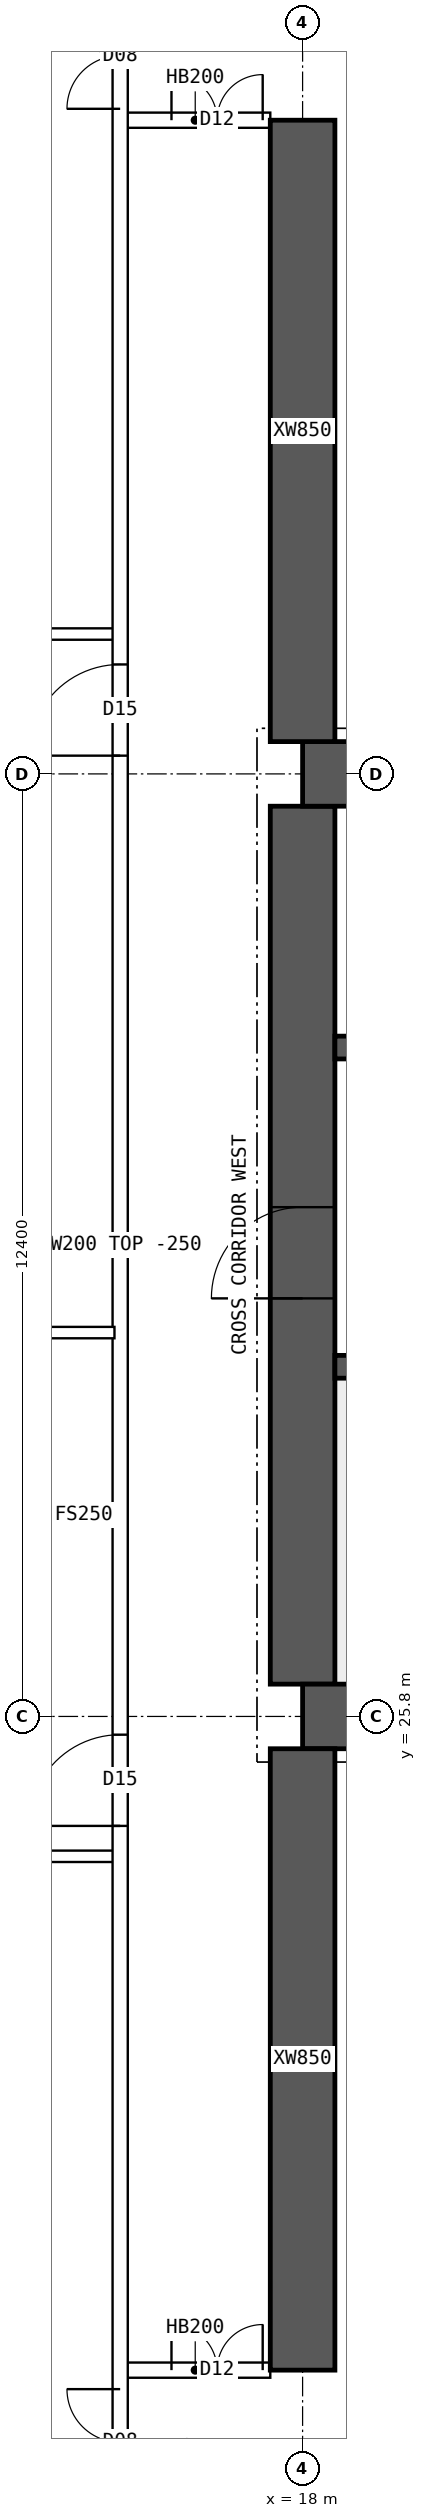
"""IFC4 building model, lengths in metres.
Left out: names, types, materials, properties, quantities, classifications, styles, units other than length and angle.
Written with IfcOpenShell. Run it as: python <this file> out.ifc"""

import sys

from ifc_helpers import new_model, si_unit, direction, frame, frame_2d, origin, place, context, subcontext, project, spatial, polyline, rectangle, outline, extrude, element, fill, save


model = new_model("IFC4")
c1 = context("Model", 3, precision=1e-05, world=origin(), true_north=direction((0.0, 1.0)))
c2 = subcontext(c1, "Body", "Model", "MODEL_VIEW")
j1 = project(units=[si_unit("LENGTHUNIT", "METRE"), si_unit("PLANEANGLEUNIT", "RADIAN")], contexts=[c1])
p1 = place(None, origin())
s1 = spatial("IfcSite", under=j1, at=p1, CompositionType="ELEMENT")
p2 = place(p1, origin())
s2 = spatial("IfcBuilding", under=s1, at=p2, CompositionType="ELEMENT")
p3 = place(p2, frame((0.0, 0.0, 156.1)))
s3 = spatial("IfcBuildingStorey", under=s2, at=p3, CompositionType="ELEMENT", Elevation=156.1)
for number, where, z_axis, x_axis in (
    (1, (18.0, 25.8, 0.0), (0.0, 0.0, 1.0), (1.0, 0.0, 0.0)),
    (2, (18.0, 38.2, 0.0), (0.0, 0.0, 1.0), (1.0, 0.0, 0.0)),
):
    element("IfcWall", number, at=place(p3, frame(where, z_axis=z_axis, x_axis=x_axis)), inside=s3, PredefinedType="SHEAR", context=c2, shape_type="SweptSolid", body=[
        extrude(rectangle(XDim=48.0, YDim=0.85, at=frame_2d((24.0, 0.0))), origin(), (0.0, 0.0, 1.0), 3.75),
    ])
p4 = place(p3, frame((18.0, 26.225, 0.0), z_axis=(0.0, 0.0, 1.0), x_axis=(0.0, 1.0, 0.0)))
e3 = element("IfcWall", 3, at=p4, inside=s3, PredefinedType="SHEAR", context=c2, shape_type="SweptSolid", body=[
    extrude(rectangle(XDim=11.55, YDim=0.85, at=frame_2d((5.775, 0.0))), origin(), (0.0, 0.0, 1.0), 3.75),
])
p5 = place(p4, frame((5.075, 0.0, 0.0)))
e4 = element("IfcOpeningElement", 4, at=p5, cuts=e3, PredefinedType="OPENING", context=c2, shape_type="SweptSolid", body=[
    extrude(rectangle(XDim=1.2, YDim=2.1, at=frame_2d((0.6, 1.05))), frame((0.0, 0.435, 0.0), z_axis=(0.0, -1.0, 0.0), x_axis=(1.0, 0.0, 0.0)), (0.0, 0.0, 1.0), 0.87),
])
p6 = place(p3, frame((18.425, 30.4, 0.0), z_axis=(0.0, 0.0, 1.0), x_axis=(1.0, 0.0, 0.0)))
e5 = element("IfcWall", 5, at=p6, inside=s3, PredefinedType="SHEAR", context=c2, shape_type="SweptSolid", body=[
    extrude(rectangle(XDim=47.15, YDim=0.3, at=frame_2d((23.575, 0.0))), origin(), (0.0, 0.0, 1.0), 3.75),
])
p7 = place(p6, frame((0.4, 0.0, 0.0)))
e6 = element("IfcOpeningElement", 6, at=p7, cuts=e5, PredefinedType="OPENING", context=c2, shape_type="SweptSolid", body=[
    extrude(rectangle(XDim=1.0, YDim=2.1, at=frame_2d((0.5, 1.05))), frame((0.0, 0.16, 0.0), z_axis=(0.0, -1.0, 0.0), x_axis=(1.0, 0.0, 0.0)), (0.0, 0.0, 1.0), 0.32),
])
p8 = place(p6, frame((45.75, 0.0, 0.0)))
e7 = element("IfcOpeningElement", 7, at=p8, cuts=e5, PredefinedType="OPENING", context=c2, shape_type="SweptSolid", body=[
    extrude(rectangle(XDim=1.0, YDim=2.1, at=frame_2d((0.5, 1.05))), frame((0.0, 0.16, 0.0), z_axis=(0.0, -1.0, 0.0), x_axis=(1.0, 0.0, 0.0)), (0.0, 0.0, 1.0), 0.32),
])
p9 = place(p6, frame((8.325, 0.0, 0.0)))
e8 = element("IfcOpeningElement", 8, at=p9, cuts=e5, PredefinedType="OPENING", context=c2, shape_type="SweptSolid", body=[
    extrude(rectangle(XDim=1.1, YDim=2.1, at=frame_2d((0.55, 1.05))), frame((0.0, 0.16, 0.0), z_axis=(0.0, -1.0, 0.0), x_axis=(1.0, 0.0, 0.0)), (0.0, 0.0, 1.0), 0.32),
])
p10 = place(p6, frame((10.925, 0.0, 0.0)))
e9 = element("IfcOpeningElement", 9, at=p10, cuts=e5, PredefinedType="OPENING", context=c2, shape_type="SweptSolid", body=[
    extrude(rectangle(XDim=1.1, YDim=2.1, at=frame_2d((0.55, 1.05))), frame((0.0, 0.16, 0.0), z_axis=(0.0, -1.0, 0.0), x_axis=(1.0, 0.0, 0.0)), (0.0, 0.0, 1.0), 0.32),
])
p11 = place(p6, frame((13.525, 0.0, 0.0)))
e10 = element("IfcOpeningElement", 10, at=p11, cuts=e5, PredefinedType="OPENING", context=c2, shape_type="SweptSolid", body=[
    extrude(rectangle(XDim=1.1, YDim=2.1, at=frame_2d((0.55, 1.05))), frame((0.0, 0.16, 0.0), z_axis=(0.0, -1.0, 0.0), x_axis=(1.0, 0.0, 0.0)), (0.0, 0.0, 1.0), 0.32),
])
p12 = place(p6, frame((16.125, 0.0, 0.0)))
e11 = element("IfcOpeningElement", 11, at=p12, cuts=e5, PredefinedType="OPENING", context=c2, shape_type="SweptSolid", body=[
    extrude(rectangle(XDim=1.1, YDim=2.1, at=frame_2d((0.55, 1.05))), frame((0.0, 0.16, 0.0), z_axis=(0.0, -1.0, 0.0), x_axis=(1.0, 0.0, 0.0)), (0.0, 0.0, 1.0), 0.32),
])
p13 = place(p6, frame((18.9, 0.0, 0.0)))
e12 = element("IfcOpeningElement", 12, at=p13, cuts=e5, PredefinedType="OPENING", context=c2, shape_type="SweptSolid", body=[
    extrude(rectangle(XDim=0.9, YDim=2.1, at=frame_2d((0.45, 1.05))), frame((0.0, 0.16, 0.0), z_axis=(0.0, -1.0, 0.0), x_axis=(1.0, 0.0, 0.0)), (0.0, 0.0, 1.0), 0.32),
])
p14 = place(p6, frame((30.192, 0.0, 0.0)))
e13 = element("IfcOpeningElement", 13, at=p14, cuts=e5, PredefinedType="OPENING", context=c2, shape_type="SweptSolid", body=[
    extrude(rectangle(XDim=1.1, YDim=2.1, at=frame_2d((0.55, 1.05))), frame((0.0, 0.16, 0.0), z_axis=(0.0, -1.0, 0.0), x_axis=(1.0, 0.0, 0.0)), (0.0, 0.0, 1.0), 0.32),
])
p15 = place(p6, frame((33.725, 0.0, 0.0)))
e14 = element("IfcOpeningElement", 14, at=p15, cuts=e5, PredefinedType="OPENING", context=c2, shape_type="SweptSolid", body=[
    extrude(rectangle(XDim=1.1, YDim=2.1, at=frame_2d((0.55, 1.05))), frame((0.0, 0.16, 0.0), z_axis=(0.0, -1.0, 0.0), x_axis=(1.0, 0.0, 0.0)), (0.0, 0.0, 1.0), 0.32),
])
p16 = place(p6, frame((37.258, 0.0, 0.0)))
e15 = element("IfcOpeningElement", 15, at=p16, cuts=e5, PredefinedType="OPENING", context=c2, shape_type="SweptSolid", body=[
    extrude(rectangle(XDim=1.1, YDim=2.1, at=frame_2d((0.55, 1.05))), frame((0.0, 0.16, 0.0), z_axis=(0.0, -1.0, 0.0), x_axis=(1.0, 0.0, 0.0)), (0.0, 0.0, 1.0), 0.32),
])
p17 = place(p3, frame((18.425, 34.6, 0.0), z_axis=(0.0, 0.0, 1.0), x_axis=(1.0, 0.0, 0.0)))
e16 = element("IfcWall", 16, at=p17, inside=s3, PredefinedType="SHEAR", context=c2, shape_type="SweptSolid", body=[
    extrude(rectangle(XDim=47.15, YDim=0.3, at=frame_2d((23.575, 0.0))), origin(), (0.0, 0.0, 1.0), 3.75),
])
p18 = place(p17, frame((0.9, 0.0, 0.0)))
e17 = element("IfcOpeningElement", 17, at=p18, cuts=e16, PredefinedType="OPENING", context=c2, shape_type="SweptSolid", body=[
    extrude(rectangle(XDim=1.1, YDim=2.1, at=frame_2d((0.55, 1.05))), frame((0.0, 0.16, 0.0), z_axis=(0.0, -1.0, 0.0), x_axis=(1.0, 0.0, 0.0)), (0.0, 0.0, 1.0), 0.32),
])
p19 = place(p17, frame((45.15, 0.0, 0.0)))
e18 = element("IfcOpeningElement", 18, at=p19, cuts=e16, PredefinedType="OPENING", context=c2, shape_type="SweptSolid", body=[
    extrude(rectangle(XDim=1.1, YDim=2.1, at=frame_2d((0.55, 1.05))), frame((0.0, 0.16, 0.0), z_axis=(0.0, -1.0, 0.0), x_axis=(1.0, 0.0, 0.0)), (0.0, 0.0, 1.0), 0.32),
])
p20 = place(p17, frame((4.175, 0.0, 0.0)))
e19 = element("IfcOpeningElement", 19, at=p20, cuts=e16, PredefinedType="OPENING", context=c2, shape_type="SweptSolid", body=[
    extrude(rectangle(XDim=0.9, YDim=2.1, at=frame_2d((0.45, 1.05))), frame((0.0, 0.16, 0.0), z_axis=(0.0, -1.0, 0.0), x_axis=(1.0, 0.0, 0.0)), (0.0, 0.0, 1.0), 0.32),
])
p21 = place(p17, frame((42.075, 0.0, 0.0)))
e20 = element("IfcOpeningElement", 20, at=p21, cuts=e16, PredefinedType="OPENING", context=c2, shape_type="SweptSolid", body=[
    extrude(rectangle(XDim=0.9, YDim=2.1, at=frame_2d((0.45, 1.05))), frame((0.0, 0.16, 0.0), z_axis=(0.0, -1.0, 0.0), x_axis=(1.0, 0.0, 0.0)), (0.0, 0.0, 1.0), 0.32),
])
p22 = place(p17, frame((8.95, 0.0, 0.0)))
e21 = element("IfcOpeningElement", 21, at=p22, cuts=e16, PredefinedType="OPENING", context=c2, shape_type="SweptSolid", body=[
    extrude(rectangle(XDim=0.9, YDim=2.1, at=frame_2d((0.45, 1.05))), frame((0.0, 0.16, 0.0), z_axis=(0.0, -1.0, 0.0), x_axis=(1.0, 0.0, 0.0)), (0.0, 0.0, 1.0), 0.32),
])
p23 = place(p17, frame((12.924, 0.0, 0.0)))
e22 = element("IfcOpeningElement", 22, at=p23, cuts=e16, PredefinedType="OPENING", context=c2, shape_type="SweptSolid", body=[
    extrude(rectangle(XDim=0.9, YDim=2.1, at=frame_2d((0.45, 1.05))), frame((0.0, 0.16, 0.0), z_axis=(0.0, -1.0, 0.0), x_axis=(1.0, 0.0, 0.0)), (0.0, 0.0, 1.0), 0.32),
])
p24 = place(p17, frame((16.571, 0.0, 0.0)))
e23 = element("IfcOpeningElement", 23, at=p24, cuts=e16, PredefinedType="OPENING", context=c2, shape_type="SweptSolid", body=[
    extrude(rectangle(XDim=0.9, YDim=2.1, at=frame_2d((0.45, 1.05))), frame((0.0, 0.16, 0.0), z_axis=(0.0, -1.0, 0.0), x_axis=(1.0, 0.0, 0.0)), (0.0, 0.0, 1.0), 0.32),
])
p25 = place(p17, frame((20.33, 0.0, 0.0)))
e24 = element("IfcOpeningElement", 24, at=p25, cuts=e16, PredefinedType="OPENING", context=c2, shape_type="SweptSolid", body=[
    extrude(rectangle(XDim=0.9, YDim=2.1, at=frame_2d((0.45, 1.05))), frame((0.0, 0.16, 0.0), z_axis=(0.0, -1.0, 0.0), x_axis=(1.0, 0.0, 0.0)), (0.0, 0.0, 1.0), 0.32),
])
p26 = place(p17, frame((24.736, 0.0, 0.0)))
e25 = element("IfcOpeningElement", 25, at=p26, cuts=e16, PredefinedType="OPENING", context=c2, shape_type="SweptSolid", body=[
    extrude(rectangle(XDim=0.9, YDim=2.1, at=frame_2d((0.45, 1.05))), frame((0.0, 0.16, 0.0), z_axis=(0.0, -1.0, 0.0), x_axis=(1.0, 0.0, 0.0)), (0.0, 0.0, 1.0), 0.32),
])
p27 = place(p17, frame((27.533, 0.0, 0.0)))
e26 = element("IfcOpeningElement", 26, at=p27, cuts=e16, PredefinedType="OPENING", context=c2, shape_type="SweptSolid", body=[
    extrude(rectangle(XDim=0.9, YDim=2.1, at=frame_2d((0.45, 1.05))), frame((0.0, 0.16, 0.0), z_axis=(0.0, -1.0, 0.0), x_axis=(1.0, 0.0, 0.0)), (0.0, 0.0, 1.0), 0.32),
])
p28 = place(p17, frame((29.906, 0.0, 0.0)))
e27 = element("IfcOpeningElement", 27, at=p28, cuts=e16, PredefinedType="OPENING", context=c2, shape_type="SweptSolid", body=[
    extrude(rectangle(XDim=0.9, YDim=2.1, at=frame_2d((0.45, 1.05))), frame((0.0, 0.16, 0.0), z_axis=(0.0, -1.0, 0.0), x_axis=(1.0, 0.0, 0.0)), (0.0, 0.0, 1.0), 0.32),
])
p29 = place(p17, frame((35.376, 0.0, 0.0)))
e28 = element("IfcOpeningElement", 28, at=p29, cuts=e16, PredefinedType="OPENING", context=c2, shape_type="SweptSolid", body=[
    extrude(rectangle(XDim=0.9, YDim=2.1, at=frame_2d((0.45, 1.05))), frame((0.0, 0.16, 0.0), z_axis=(0.0, -1.0, 0.0), x_axis=(1.0, 0.0, 0.0)), (0.0, 0.0, 1.0), 0.32),
])
for number, where, z_axis, x_axis in (
    (29, (18.0, 17.2, 0.0), (0.0, 0.0, 1.0), (0.0, 1.0, 0.0)),
    (30, (18.0, 38.625, 0.0), (0.0, 0.0, 1.0), (0.0, 1.0, 0.0)),
):
    element("IfcWall", number, at=place(p3, frame(where, z_axis=z_axis, x_axis=x_axis)), inside=s3, PredefinedType="SHEAR", context=c2, shape_type="SweptSolid", body=[
        extrude(rectangle(XDim=8.175, YDim=0.85, at=frame_2d((4.087, 0.0))), origin(), (0.0, 0.0, 1.0), 3.75),
    ])
p30 = place(p3, frame((15.6, 17.2, 0.0), z_axis=(0.0, 0.0, 1.0), x_axis=(1.0, 0.0, 0.0)))
e31 = element("IfcWall", 31, at=p30, inside=s3, PredefinedType="SOLIDWALL", context=c2, shape_type="SweptSolid", body=[
    extrude(rectangle(XDim=1.975, YDim=0.2, at=frame_2d((0.987, 0.0))), origin(), (0.0, 0.0, 1.0), 3.5),
])
p31 = place(p30, frame((0.675, 0.0, 0.0)))
e32 = element("IfcOpeningElement", 32, at=p31, cuts=e31, PredefinedType="OPENING", context=c2, shape_type="SweptSolid", body=[
    extrude(rectangle(XDim=1.2, YDim=2.1, at=frame_2d((0.6, 1.05))), frame((0.0, 0.11, 0.0), z_axis=(0.0, -1.0, 0.0), x_axis=(1.0, 0.0, 0.0)), (0.0, 0.0, 1.0), 0.22),
])
p32 = place(p3, frame((15.6, 46.8, 0.0), z_axis=(0.0, 0.0, 1.0), x_axis=(1.0, 0.0, 0.0)))
e33 = element("IfcWall", 33, at=p32, inside=s3, PredefinedType="SOLIDWALL", context=c2, shape_type="SweptSolid", body=[
    extrude(rectangle(XDim=1.975, YDim=0.2, at=frame_2d((0.987, 0.0))), origin(), (0.0, 0.0, 1.0), 3.5),
])
p33 = place(p32, frame((0.675, 0.0, 0.0)))
e34 = element("IfcOpeningElement", 34, at=p33, cuts=e33, PredefinedType="OPENING", context=c2, shape_type="SweptSolid", body=[
    extrude(rectangle(XDim=1.2, YDim=2.1, at=frame_2d((0.6, 1.05))), frame((0.0, 0.11, 0.0), z_axis=(0.0, -1.0, 0.0), x_axis=(1.0, 0.0, 0.0)), (0.0, 0.0, 1.0), 0.22),
])
p34 = place(p3, frame((8.705, 30.85, 0.0), z_axis=(0.0, 0.0, 1.0), x_axis=(1.0, 0.0, 0.0)))
e35 = element("IfcWall", 35, at=p34, inside=s3, PredefinedType="PARTITIONING", context=c2, shape_type="SweptSolid", body=[
    extrude(outline(polyline([(0.0, 0.0), (6.82, 0.0), (6.82, 3.5), (3.597, 3.5), (3.595, 3.05), (2.997, 3.05), (2.995, 3.5), (0.0, 3.5), (0.0, 0.0)])), frame((0.0, 0.075, 0.0), z_axis=(0.0, -1.0, 0.0), x_axis=(1.0, 0.0, 0.0)), (0.0, 0.0, 1.0), 0.15),
])
p35 = place(p3, frame((15.6, 10.446, 0.0), z_axis=(0.0, 0.0, 1.0), x_axis=(0.0, 1.0, 0.0)))
e36 = element("IfcWall", 36, at=p35, inside=s3, PredefinedType="SOLIDWALL", context=c2, shape_type="SweptSolid", body=[
    extrude(rectangle(XDim=43.107, YDim=0.2, at=frame_2d((21.554, 0.0))), origin(), (0.0, 0.0, 1.0), 3.5),
])
p36 = place(p35, frame((13.914, 0.0, 0.0)))
e37 = element("IfcOpeningElement", 37, at=p36, cuts=e36, PredefinedType="OPENING", context=c2, shape_type="SweptSolid", body=[
    extrude(rectangle(XDim=1.2, YDim=2.1, at=frame_2d((0.6, 1.05))), frame((0.0, 0.11, 0.0), z_axis=(0.0, -1.0, 0.0), x_axis=(1.0, 0.0, 0.0)), (0.0, 0.0, 1.0), 0.22),
])
p37 = place(p35, frame((27.994, 0.0, 0.0)))
e38 = element("IfcOpeningElement", 38, at=p37, cuts=e36, PredefinedType="OPENING", context=c2, shape_type="SweptSolid", body=[
    extrude(rectangle(XDim=1.2, YDim=2.1, at=frame_2d((0.6, 1.05))), frame((0.0, 0.11, 0.0), z_axis=(0.0, -1.0, 0.0), x_axis=(1.0, 0.0, 0.0)), (0.0, 0.0, 1.0), 0.22),
])
p38 = place(p35, frame((5.104, 0.0, 0.0)))
e39 = element("IfcOpeningElement", 39, at=p38, cuts=e36, PredefinedType="OPENING", context=c2, shape_type="SweptSolid", body=[
    extrude(rectangle(XDim=1.4, YDim=2.1, at=frame_2d((0.7, 1.05))), frame((0.0, 0.11, 0.0), z_axis=(0.0, -1.0, 0.0), x_axis=(1.0, 0.0, 0.0)), (0.0, 0.0, 1.0), 0.22),
])
p39 = place(p35, frame((36.504, 0.0, 0.0)))
e40 = element("IfcOpeningElement", 40, at=p39, cuts=e36, PredefinedType="OPENING", context=c2, shape_type="SweptSolid", body=[
    extrude(rectangle(XDim=1.4, YDim=2.1, at=frame_2d((0.7, 1.05))), frame((0.0, 0.11, 0.0), z_axis=(0.0, -1.0, 0.0), x_axis=(1.0, 0.0, 0.0)), (0.0, 0.0, 1.0), 0.22),
])
for number, where, z_axis, x_axis in (
    (41, (8.705, 23.96, 0.0), (0.0, 0.0, 1.0), (1.0, 0.0, 0.0)),
    (42, (8.705, 40.04, 0.0), (0.0, 0.0, 1.0), (1.0, 0.0, 0.0)),
):
    element("IfcWall", number, at=place(p3, frame(where, z_axis=z_axis, x_axis=x_axis)), inside=s3, PredefinedType="PARTITIONING", context=c2, shape_type="SweptSolid", body=[
        extrude(rectangle(XDim=6.82, YDim=0.15, at=frame_2d((3.41, 0.0))), origin(), (0.0, 0.0, 1.0), 3.5),
    ])
p40 = place(p5, origin())
e43 = element("IfcDoor", 43, at=p40, inside=s3, OperationType="SINGLE_SWING_LEFT", PredefinedType="DOOR", context=c2, shape_type="SweptSolid", body=[
    extrude(rectangle(XDim=1.2, YDim=2.1, at=frame_2d((0.6, 1.05))), frame((0.0, 0.025, 0.0), z_axis=(0.0, -1.0, 0.0), x_axis=(1.0, 0.0, 0.0)), (0.0, 0.0, 1.0), 0.05),
])
fill(e4, e43)
p41 = place(p31, origin())
e44 = element("IfcDoor", 44, at=p41, inside=s3, OperationType="DOUBLE_DOOR_SINGLE_SWING", PredefinedType="DOOR", context=c2, shape_type="SweptSolid", body=[
    extrude(rectangle(XDim=1.2, YDim=2.1, at=frame_2d((0.6, 1.05))), frame((0.0, 0.025, 0.0), z_axis=(0.0, -1.0, 0.0), x_axis=(1.0, 0.0, 0.0)), (0.0, 0.0, 1.0), 0.05),
])
fill(e32, e44)
p42 = place(p33, origin())
e45 = element("IfcDoor", 45, at=p42, inside=s3, OperationType="DOUBLE_DOOR_SINGLE_SWING", PredefinedType="DOOR", context=c2, shape_type="SweptSolid", body=[
    extrude(rectangle(XDim=1.2, YDim=2.1, at=frame_2d((0.6, 1.05))), frame((0.0, 0.025, 0.0), z_axis=(0.0, -1.0, 0.0), x_axis=(1.0, 0.0, 0.0)), (0.0, 0.0, 1.0), 0.05),
])
fill(e34, e45)
p43 = place(p36, origin())
e46 = element("IfcDoor", 46, at=p43, inside=s3, OperationType="SINGLE_SWING_LEFT", PredefinedType="DOOR", context=c2, shape_type="SweptSolid", body=[
    extrude(rectangle(XDim=1.2, YDim=2.1, at=frame_2d((0.6, 1.05))), frame((0.0, 0.025, 0.0), z_axis=(0.0, -1.0, 0.0), x_axis=(1.0, 0.0, 0.0)), (0.0, 0.0, 1.0), 0.05),
])
fill(e37, e46)
p44 = place(p37, origin())
e47 = element("IfcDoor", 47, at=p44, inside=s3, OperationType="SINGLE_SWING_LEFT", PredefinedType="DOOR", context=c2, shape_type="SweptSolid", body=[
    extrude(rectangle(XDim=1.2, YDim=2.1, at=frame_2d((0.6, 1.05))), frame((0.0, 0.025, 0.0), z_axis=(0.0, -1.0, 0.0), x_axis=(1.0, 0.0, 0.0)), (0.0, 0.0, 1.0), 0.05),
])
fill(e38, e47)
p45 = place(p38, origin())
e48 = element("IfcDoor", 48, at=p45, inside=s3, OperationType="DOUBLE_DOOR_SINGLE_SWING", PredefinedType="DOOR", context=c2, shape_type="SweptSolid", body=[
    extrude(rectangle(XDim=1.4, YDim=2.1, at=frame_2d((0.7, 1.05))), frame((0.0, 0.025, 0.0), z_axis=(0.0, -1.0, 0.0), x_axis=(1.0, 0.0, 0.0)), (0.0, 0.0, 1.0), 0.05),
])
fill(e39, e48)
p46 = place(p39, origin())
e49 = element("IfcDoor", 49, at=p46, inside=s3, OperationType="DOUBLE_DOOR_SINGLE_SWING", PredefinedType="DOOR", context=c2, shape_type="SweptSolid", body=[
    extrude(rectangle(XDim=1.4, YDim=2.1, at=frame_2d((0.7, 1.05))), frame((0.0, 0.025, 0.0), z_axis=(0.0, -1.0, 0.0), x_axis=(1.0, 0.0, 0.0)), (0.0, 0.0, 1.0), 0.05),
])
fill(e40, e49)
save(model, sys.argv[1])
